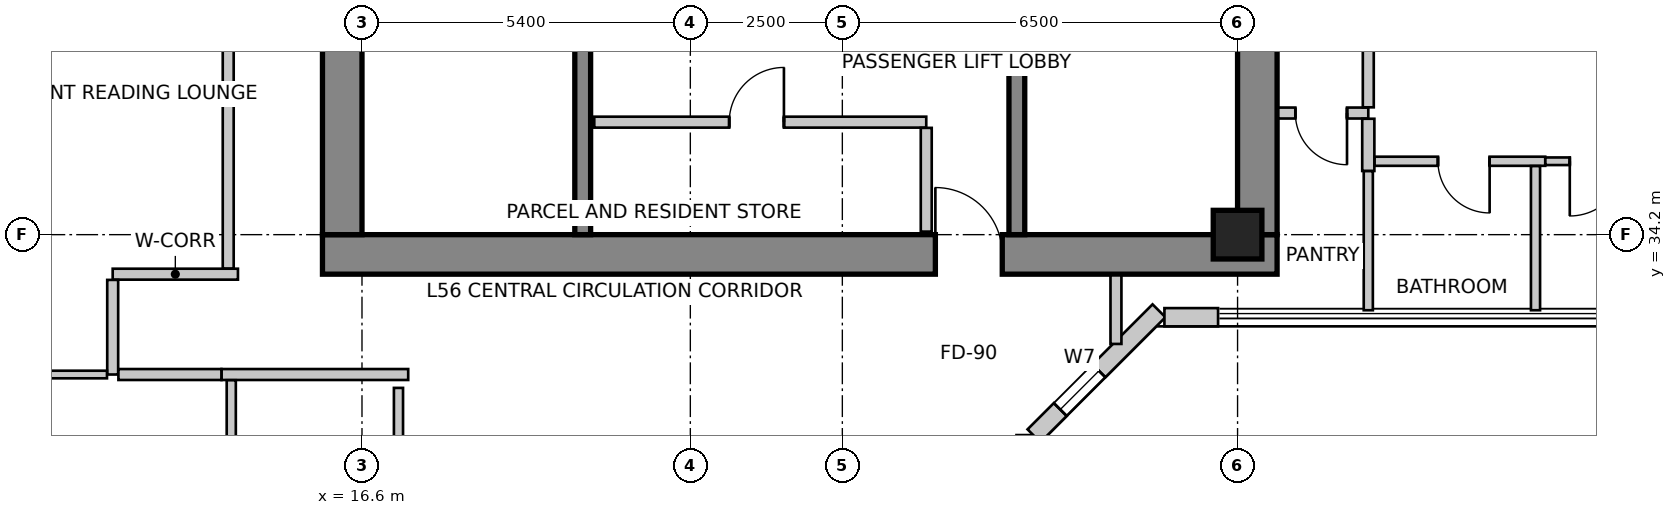
"""IFC4 building model, lengths in metres.
Left out: names, types, materials, properties, quantities, classifications, styles, units other than length and angle.
Written with IfcOpenShell. Run it as: python <this file> out.ifc"""

import sys

from ifc_helpers import new_model, si_unit, direction, frame, frame_2d, origin, origin_2d, place, context, subcontext, project, spatial, rectangle, extrude, source, transform, mapped, element, fill, save


model = new_model("IFC4")
c1 = context("Model", 3, precision=1e-05, world=origin(), true_north=direction((0.0, 1.0)))
c2 = subcontext(c1, "Body", "Model", "MODEL_VIEW")
j1 = project(units=[si_unit("LENGTHUNIT", "METRE"), si_unit("PLANEANGLEUNIT", "RADIAN")], contexts=[c1])
p1 = place(None, origin())
s1 = spatial("IfcSite", under=j1, at=p1, CompositionType="ELEMENT")
p2 = place(p1, origin())
s2 = spatial("IfcBuilding", under=s1, at=p2, CompositionType="ELEMENT")
p3 = place(p2, frame((0.0, 0.0, 221.9)))
s3 = spatial("IfcBuildingStorey", under=s2, at=p3, CompositionType="ELEMENT", Elevation=221.9)
p4 = place(p3, frame((15.95, 33.875, 0.0), z_axis=(0.0, 0.0, 1.0), x_axis=(1.0, 0.0, 0.0)))
e1 = element("IfcWall", 1, at=p4, inside=s3, PredefinedType="SHEAR", context=c2, shape_type="SweptSolid", body=[
    extrude(rectangle(XDim=15.7, YDim=0.65, at=frame_2d((7.85, 0.0))), origin(), (0.0, 0.0, 1.0), 3.5),
])
m1 = source(origin(), c2, "Body", "SweptSolid", [
    extrude(rectangle(XDim=1.1, YDim=2.15, at=frame_2d((0.55, 1.075))), frame((0.0, 0.335, 0.0), z_axis=(0.0, -1.0, 0.0), x_axis=(1.0, 0.0, 0.0)), (0.0, 0.0, 1.0), 0.67),
])
p5 = place(p4, frame((10.08, 0.0, 0.0)))
e2 = element("IfcOpeningElement", 2, at=p5, cuts=e1, PredefinedType="OPENING", context=c2, shape_type="MappedRepresentation", body=[
    mapped(m1, transform((0.0, 0.0, 0.0), scale=1.0)),
])
p6 = place(p3, frame((16.275, 34.2, 0.0), z_axis=(0.0, 0.0, 1.0), x_axis=(0.0, 1.0, 0.0)))
e3 = element("IfcWall", 3, at=p6, inside=s3, PredefinedType="SHEAR", context=c2, shape_type="SweptSolid", body=[
    extrude(rectangle(XDim=11.4, YDim=0.65, at=frame_2d((5.7, 0.0))), origin(), (0.0, 0.0, 1.0), 3.5),
])
p7 = place(p6, frame((7.15, 0.0, 0.0)))
e4 = element("IfcOpeningElement", 4, at=p7, cuts=e3, PredefinedType="OPENING", context=c2, shape_type="MappedRepresentation", body=[
    mapped(m1, transform((0.0, 0.0, 0.0), scale=1.0)),
])
p8 = place(p3, frame((31.325, 34.2, 0.0), z_axis=(0.0, 0.0, 1.0), x_axis=(0.0, 1.0, 0.0)))
e5 = element("IfcWall", 5, at=p8, inside=s3, PredefinedType="SHEAR", context=c2, shape_type="SweptSolid", body=[
    extrude(rectangle(XDim=11.4, YDim=0.65, at=frame_2d((5.7, 0.0))), origin(), (0.0, 0.0, 1.0), 3.5),
])
p9 = place(p8, frame((7.35, 0.0, 0.0)))
e6 = element("IfcOpeningElement", 6, at=p9, cuts=e5, PredefinedType="OPENING", context=c2, shape_type="MappedRepresentation", body=[
    mapped(m1, transform((0.0, 0.0, 0.0), scale=1.0)),
])
p10 = place(p3, frame((20.23, 34.2, 0.0), z_axis=(0.0, 0.0, 1.0), x_axis=(0.0, 1.0, 0.0)))
e7 = element("IfcWall", 7, at=p10, inside=s3, PredefinedType="SHEAR", context=c2, shape_type="SweptSolid", body=[
    extrude(rectangle(XDim=9.06, YDim=0.26, at=frame_2d((4.53, 0.0))), origin(), (0.0, 0.0, 1.0), 3.5),
])
m2 = source(origin(), c2, "Body", "SweptSolid", [
    extrude(rectangle(XDim=1.1, YDim=2.15, at=frame_2d((0.55, 1.075))), frame((0.0, 0.14, 0.0), z_axis=(0.0, -1.0, 0.0), x_axis=(1.0, 0.0, 0.0)), (0.0, 0.0, 1.0), 0.28),
])
p11 = place(p10, frame((7.45, 0.0, 0.0)))
e8 = element("IfcOpeningElement", 8, at=p11, cuts=e7, PredefinedType="OPENING", context=c2, shape_type="MappedRepresentation", body=[
    mapped(m2, transform((0.0, 0.0, 0.0), scale=1.0)),
])
p12 = place(p3, frame((27.37, 34.2, 0.0), z_axis=(0.0, 0.0, 1.0), x_axis=(0.0, 1.0, 0.0)))
e9 = element("IfcWall", 9, at=p12, inside=s3, PredefinedType="SHEAR", context=c2, shape_type="SweptSolid", body=[
    extrude(rectangle(XDim=9.06, YDim=0.26, at=frame_2d((4.53, 0.0))), origin(), (0.0, 0.0, 1.0), 3.5),
])
p13 = place(p12, frame((7.45, 0.0, 0.0)))
e10 = element("IfcOpeningElement", 10, at=p13, cuts=e9, PredefinedType="OPENING", context=c2, shape_type="MappedRepresentation", body=[
    mapped(m2, transform((0.0, 0.0, 0.0), scale=1.0)),
])
m3 = source(origin(), c2, "Body", "SweptSolid", [
    extrude(rectangle(XDim=0.8, YDim=0.8, at=origin_2d()), origin(), (0.0, 0.0, 1.0), 3.5),
])
p14 = place(p3, frame((31.0, 34.2, 0.0), z_axis=(0.0, 0.0, 1.0), x_axis=(1.0, 0.0, 0.0)))
e11 = element("IfcColumn", 11, at=p14, inside=s3, PredefinedType="COLUMN", context=c2, shape_type="MappedRepresentation", body=[
    mapped(m3, transform((0.0, 0.0, 0.0), scale=1.0)),
])
p15 = place(p3, frame((27.514, 29.677, 0.0), z_axis=(0.0, 0.0, 1.0), x_axis=(0.0, 1.0, 0.0)))
e12 = element("IfcWall", 12, at=p15, inside=s3, PredefinedType="SOLIDWALL", context=c2, shape_type="SweptSolid", body=[
    extrude(rectangle(XDim=1.228, YDim=0.3, at=frame_2d((0.614, 0.0))), origin(), (0.0, 0.0, 1.0), 3.25),
])
p16 = place(p3, frame((27.652, 30.892, 0.0), z_axis=(0.0, 0.0, 1.0), x_axis=(0.707106781187, 0.707106781187, 0.0)))
e13 = element("IfcWall", 13, at=p16, inside=s3, PredefinedType="SOLIDWALL", context=c2, shape_type="SweptSolid", body=[
    extrude(rectangle(XDim=2.907, YDim=0.3, at=frame_2d((1.454, 0.0))), origin(), (0.0, 0.0, 1.0), 3.25),
])
m4 = source(origin(), c2, "Body", "SweptSolid", [
    extrude(rectangle(XDim=0.9, YDim=1.6, at=frame_2d((0.45, 0.8))), frame((0.0, 0.16, 0.0), z_axis=(0.0, -1.0, 0.0), x_axis=(1.0, 0.0, 0.0)), (0.0, 0.0, 1.0), 0.32),
])
p17 = place(p16, frame((0.611, 0.0, 0.85)))
e14 = element("IfcOpeningElement", 14, at=p17, cuts=e13, PredefinedType="OPENING", context=c2, shape_type="MappedRepresentation", body=[
    mapped(m4, transform((0.0, 0.0, 0.0), scale=1.0)),
])
p18 = place(p3, frame((29.797, 32.842, 0.0), z_axis=(0.0, 0.0, 1.0), x_axis=(1.0, 0.0, 0.0)))
e15 = element("IfcWall", 15, at=p18, inside=s3, PredefinedType="SOLIDWALL", context=c2, shape_type="SweptSolid", body=[
    extrude(rectangle(XDim=0.882, YDim=0.3, at=frame_2d((0.441, 0.0))), origin(), (0.0, 0.0, 1.0), 3.25),
])
p19 = place(p3, frame((13.269, 47.134, 0.0), z_axis=(0.0, 0.0, 1.0), x_axis=(-0.319920776449, -0.947444297464, 0.0)))
e16 = element("IfcWall", 16, at=p19, inside=s3, PredefinedType="SOLIDWALL", context=c2, shape_type="SweptSolid", body=[
    extrude(rectangle(XDim=16.133, YDim=0.3, at=frame_2d((8.067, 0.0))), origin(), (0.0, 0.0, 1.0), 3.25),
])
m5 = source(origin(), c2, "Body", "SweptSolid", [
    extrude(rectangle(XDim=2.4, YDim=2.2, at=frame_2d((1.2, 1.1))), frame((0.0, 0.16, 0.0), z_axis=(0.0, -1.0, 0.0), x_axis=(1.0, 0.0, 0.0)), (0.0, 0.0, 1.0), 0.32),
])
p20 = place(p19, frame((2.363, 0.0, 0.85)))
e17 = element("IfcOpeningElement", 17, at=p20, cuts=e16, PredefinedType="OPENING", context=c2, shape_type="MappedRepresentation", body=[
    mapped(m5, transform((0.0, 0.0, 0.0), scale=1.0)),
])
m6 = source(origin(), c2, "Body", "SweptSolid", [
    extrude(rectangle(XDim=2.1, YDim=2.0, at=frame_2d((1.05, 1.0))), frame((0.0, 0.16, 0.0), z_axis=(0.0, -1.0, 0.0), x_axis=(1.0, 0.0, 0.0)), (0.0, 0.0, 1.0), 0.32),
])
p21 = place(p19, frame((7.41, 0.0, 0.85)))
e18 = element("IfcOpeningElement", 18, at=p21, cuts=e16, PredefinedType="OPENING", context=c2, shape_type="MappedRepresentation", body=[
    mapped(m6, transform((0.0, 0.0, 0.0), scale=1.0)),
])
p22 = place(p19, frame((12.157, 0.0, 0.85)))
e19 = element("IfcOpeningElement", 19, at=p22, cuts=e16, PredefinedType="OPENING", context=c2, shape_type="MappedRepresentation", body=[
    mapped(m5, transform((0.0, 0.0, 0.0), scale=1.0)),
])
p23 = place(p3, frame((8.188, 31.834, 0.0), z_axis=(0.0, 0.0, 1.0), x_axis=(0.202303475707, -0.979322880217, 0.0)))
e20 = element("IfcWall", 20, at=p23, inside=s3, PredefinedType="SOLIDWALL", context=c2, shape_type="SweptSolid", body=[
    extrude(rectangle(XDim=15.766, YDim=0.3, at=frame_2d((7.883, 0.0))), origin(), (0.0, 0.0, 1.0), 3.25),
])
p24 = place(p23, frame((1.407, 0.0, 0.85)))
e21 = element("IfcOpeningElement", 21, at=p24, cuts=e20, PredefinedType="OPENING", context=c2, shape_type="MappedRepresentation", body=[
    mapped(m6, transform((0.0, 0.0, 0.0), scale=1.0)),
])
p25 = place(p23, frame((6.194, 0.0, 0.85)))
e22 = element("IfcOpeningElement", 22, at=p25, cuts=e20, PredefinedType="OPENING", context=c2, shape_type="MappedRepresentation", body=[
    mapped(m6, transform((0.0, 0.0, 0.0), scale=1.0)),
])
p26 = place(p23, frame((11.054, 0.0, 0.85)))
e23 = element("IfcOpeningElement", 23, at=p26, cuts=e20, PredefinedType="OPENING", context=c2, shape_type="MappedRepresentation", body=[
    mapped(m6, transform((0.0, 0.0, 0.0), scale=1.0)),
])
p27 = place(p3, frame((20.42, 36.05, 0.0), z_axis=(0.0, 0.0, 1.0), x_axis=(1.0, 0.0, 0.0)))
e24 = element("IfcWall", 24, at=p27, inside=s3, PredefinedType="PARTITIONING", context=c2, shape_type="SweptSolid", body=[
    extrude(rectangle(XDim=5.46, YDim=0.18, at=frame_2d((2.73, 0.0))), origin(), (0.0, 0.0, 1.0), 3.25),
])
m7 = source(origin(), c2, "Body", "SweptSolid", [
    extrude(rectangle(XDim=0.9, YDim=2.15, at=frame_2d((0.45, 1.075))), frame((0.0, 0.1, 0.0), z_axis=(0.0, -1.0, 0.0), x_axis=(1.0, 0.0, 0.0)), (0.0, 0.0, 1.0), 0.2),
])
p28 = place(p27, frame((2.219, 0.0, 0.0)))
e25 = element("IfcOpeningElement", 25, at=p28, cuts=e24, PredefinedType="OPENING", context=c2, shape_type="MappedRepresentation", body=[
    mapped(m7, transform((0.0, 0.0, 0.0), scale=1.0)),
])
p29 = place(p3, frame((25.88, 35.956, 0.0), z_axis=(0.0, 0.0, 1.0), x_axis=(0.0, -1.0, 0.0)))
e26 = element("IfcWall", 26, at=p29, inside=s3, PredefinedType="PARTITIONING", context=c2, shape_type="SweptSolid", body=[
    extrude(rectangle(XDim=1.706, YDim=0.18, at=frame_2d((0.853, 0.0))), origin(), (0.0, 0.0, 1.0), 2.542),
])
p30 = place(p3, frame((12.5, 33.55, 0.0), z_axis=(0.0, 0.0, 1.0), x_axis=(1.0, 0.0, 0.0)))
e27 = element("IfcWall", 27, at=p30, inside=s3, PredefinedType="PARTITIONING", context=c2, shape_type="SweptSolid", body=[
    extrude(rectangle(XDim=2.06, YDim=0.18, at=frame_2d((1.03, 0.0))), origin(), (0.0, 0.0, 1.0), 3.25),
])
p31 = place(p3, frame((12.5, 31.9, 0.0), z_axis=(0.0, 0.0, 1.0), x_axis=(0.0, 1.0, 0.0)))
e28 = element("IfcWall", 28, at=p31, inside=s3, PredefinedType="PARTITIONING", context=c2, shape_type="SweptSolid", body=[
    extrude(rectangle(XDim=1.556, YDim=0.18, at=frame_2d((0.778, 0.0))), origin(), (0.0, 0.0, 1.0), 2.934),
])
p32 = place(p3, frame((29.0, 33.53, 0.0), z_axis=(0.0, 0.0, 1.0), x_axis=(0.0, -1.0, 0.0)))
e29 = element("IfcWall", 29, at=p32, inside=s3, PredefinedType="PARTITIONING", context=c2, shape_type="SweptSolid", body=[
    extrude(rectangle(XDim=1.127, YDim=0.18, at=frame_2d((0.563, 0.0))), origin(), (0.0, 0.0, 1.0), 3.25),
])
p33 = place(p3, frame((17.36, 31.9, 0.0), z_axis=(0.0, 0.0, 1.0), x_axis=(-1.0, 0.0, 0.0)))
e30 = element("IfcWall", 30, at=p33, inside=s3, PredefinedType="PARTITIONING", context=c2, shape_type="SweptSolid", body=[
    extrude(rectangle(XDim=3.07, YDim=0.18, at=frame_2d((1.535, 0.0))), origin(), (0.0, 0.0, 1.0), 2.934),
])
p34 = place(p3, frame((14.288, 31.9, 0.0), z_axis=(0.0, 0.0, 1.0), x_axis=(-1.0, 0.0, 0.0)))
e31 = element("IfcWall", 31, at=p34, inside=s3, PredefinedType="PARTITIONING", context=c2, shape_type="SweptSolid", body=[
    extrude(rectangle(XDim=1.694, YDim=0.18, at=frame_2d((0.847, 0.0))), origin(), (0.0, 0.0, 1.0), 2.934),
])
p35 = place(p3, frame((14.4, 33.644, 0.0), z_axis=(0.0, 0.0, 1.0), x_axis=(0.0, 1.0, 0.0)))
e32 = element("IfcWall", 32, at=p35, inside=s3, PredefinedType="PARTITIONING", context=c2, shape_type="SweptSolid", body=[
    extrude(rectangle(XDim=12.606, YDim=0.18, at=frame_2d((6.303, 0.0))), origin(), (0.0, 0.0, 1.0), 3.25),
])
p36 = place(p35, frame((4.399, 0.0, 0.0)))
e33 = element("IfcOpeningElement", 33, at=p36, cuts=e32, PredefinedType="OPENING", context=c2, shape_type="MappedRepresentation", body=[
    mapped(m7, transform((0.0, 0.0, 0.0), scale=1.0)),
])
p37 = place(p3, frame((33.15, 36.2, 0.0), z_axis=(0.0, 0.0, 1.0), x_axis=(-1.0, 0.0, 0.0)))
e34 = element("IfcWall", 34, at=p37, inside=s3, PredefinedType="PARTITIONING", context=c2, shape_type="SweptSolid", body=[
    extrude(rectangle(XDim=1.48, YDim=0.18, at=frame_2d((0.74, 0.0))), origin(), (0.0, 0.0, 1.0), 3.25),
])
m8 = source(origin(), c2, "Body", "SweptSolid", [
    extrude(rectangle(XDim=0.85, YDim=2.15, at=frame_2d((0.425, 1.075))), frame((0.0, 0.1, 0.0), z_axis=(0.0, -1.0, 0.0), x_axis=(1.0, 0.0, 0.0)), (0.0, 0.0, 1.0), 0.2),
])
p38 = place(p37, frame((0.35, 0.0, 0.0)))
e35 = element("IfcOpeningElement", 35, at=p38, cuts=e34, PredefinedType="OPENING", context=c2, shape_type="MappedRepresentation", body=[
    mapped(m8, transform((0.0, 0.0, 0.0), scale=1.0)),
])
p39 = place(p3, frame((33.15, 38.36, 0.0), z_axis=(0.0, 0.0, 1.0), x_axis=(0.0, -1.0, 0.0)))
e36 = element("IfcWall", 36, at=p39, inside=s3, PredefinedType="PARTITIONING", context=c2, shape_type="SweptSolid", body=[
    extrude(rectangle(XDim=2.066, YDim=0.18, at=frame_2d((1.033, 0.0))), origin(), (0.0, 0.0, 1.0), 3.25),
])
p40 = place(p3, frame((12.406, 31.9, 0.0), z_axis=(0.0, 0.0, 1.0), x_axis=(-1.0, 0.0, 0.0)))
e37 = element("IfcWall", 37, at=p40, inside=s3, PredefinedType="PARTITIONING", context=c2, shape_type="SweptSolid", body=[
    extrude(rectangle(XDim=4.115, YDim=0.125, at=frame_2d((2.057, 0.0))), origin(), (0.0, 0.0, 1.0), 2.542),
])
p41 = place(p3, frame((33.15, 36.106, 0.0), z_axis=(0.0, 0.0, 1.0), x_axis=(0.0, -1.0, 0.0)))
e38 = element("IfcWall", 38, at=p41, inside=s3, PredefinedType="PARTITIONING", context=c2, shape_type="SweptSolid", body=[
    extrude(rectangle(XDim=0.859, YDim=0.2, at=frame_2d((0.429, 0.0))), origin(), (0.0, 0.0, 1.0), 3.25),
])
p42 = place(p3, frame((33.15, 35.245, 0.0), z_axis=(0.0, 0.0, 1.0), x_axis=(0.0, -1.0, 0.0)))
e39 = element("IfcWall", 39, at=p42, inside=s3, PredefinedType="PARTITIONING", context=c2, shape_type="SweptSolid", body=[
    extrude(rectangle(XDim=2.288, YDim=0.15, at=frame_2d((1.144, 0.0))), origin(), (0.0, 0.0, 1.0), 3.25),
])
p43 = place(p3, frame((36.06, 35.407, 0.0), z_axis=(0.0, 0.0, 1.0), x_axis=(-1.0, 0.0, 0.0)))
e40 = element("IfcWall", 40, at=p43, inside=s3, PredefinedType="PARTITIONING", context=c2, shape_type="SweptSolid", body=[
    extrude(rectangle(XDim=2.806, YDim=0.15, at=frame_2d((1.403, 0.0))), origin(), (0.0, 0.0, 1.0), 3.25),
])
m9 = source(origin(), c2, "Body", "SweptSolid", [
    extrude(rectangle(XDim=0.85, YDim=2.15, at=frame_2d((0.425, 1.075))), frame((0.0, 0.085, 0.0), z_axis=(0.0, -1.0, 0.0), x_axis=(1.0, 0.0, 0.0)), (0.0, 0.0, 1.0), 0.17),
])
p44 = place(p43, frame((0.915, 0.0, 0.0)))
e41 = element("IfcOpeningElement", 41, at=p44, cuts=e40, PredefinedType="OPENING", context=c2, shape_type="MappedRepresentation", body=[
    mapped(m9, transform((0.0, 0.0, 0.0), scale=1.0)),
])
p45 = place(p3, frame((39.833, 35.407, 0.0), z_axis=(0.0, 0.0, 1.0), x_axis=(-1.0, 0.0, 0.0)))
e42 = element("IfcWall", 42, at=p45, inside=s3, PredefinedType="PARTITIONING", context=c2, shape_type="SweptSolid", body=[
    extrude(rectangle(XDim=3.771, YDim=0.125, at=frame_2d((1.886, 0.0))), origin(), (0.0, 0.0, 1.0), 2.766),
])
m10 = source(origin(), c2, "Body", "SweptSolid", [
    extrude(rectangle(XDim=0.9, YDim=2.15, at=frame_2d((0.45, 1.075))), frame((0.0, 0.073, 0.0), z_axis=(0.0, -1.0, 0.0), x_axis=(1.0, 0.0, 0.0)), (0.0, 0.0, 1.0), 0.145),
])
p46 = place(p45, frame((2.47, 0.0, 0.0)))
e43 = element("IfcOpeningElement", 43, at=p46, cuts=e42, PredefinedType="OPENING", context=c2, shape_type="MappedRepresentation", body=[
    mapped(m10, transform((0.0, 0.0, 0.0), scale=1.0)),
])
p47 = place(p3, frame((35.9, 35.328, 0.0), z_axis=(0.0, 0.0, 1.0), x_axis=(0.0, -1.0, 0.0)))
e44 = element("IfcWall", 44, at=p47, inside=s3, PredefinedType="PARTITIONING", context=c2, shape_type="SweptSolid", body=[
    extrude(rectangle(XDim=2.371, YDim=0.15, at=frame_2d((1.186, 0.0))), origin(), (0.0, 0.0, 1.0), 3.25),
])
p48 = place(p3, frame((14.45, 27.221, 0.0), z_axis=(0.0, 0.0, 1.0), x_axis=(0.0, 1.0, 0.0)))
e45 = element("IfcWall", 45, at=p48, inside=s3, PredefinedType="PARTITIONING", context=c2, shape_type="SweptSolid", body=[
    extrude(rectangle(XDim=4.585, YDim=0.15, at=frame_2d((2.292, 0.0))), origin(), (0.0, 0.0, 1.0), 2.766),
])
p49 = place(p3, frame((17.2, 31.68, 0.0), z_axis=(0.0, 0.0, 1.0), x_axis=(0.0, -1.0, 0.0)))
e46 = element("IfcWall", 46, at=p49, inside=s3, PredefinedType="PARTITIONING", context=c2, shape_type="SweptSolid", body=[
    extrude(rectangle(XDim=4.318, YDim=0.15, at=frame_2d((2.159, 0.0))), origin(), (0.0, 0.0, 1.0), 2.766),
])
m11 = source(origin(), c2, "Body", "SweptSolid", [
    extrude(rectangle(XDim=0.9, YDim=1.6, at=frame_2d((0.45, 0.8))), frame((0.0, -0.015, 0.0), z_axis=(0.0, -1.0, 0.0), x_axis=(1.0, 0.0, 0.0)), (0.0, 0.0, 1.0), 0.06),
])
p50 = place(p17, origin())
e47 = element("IfcWindow", 47, at=p50, inside=s3, PartitioningType="SINGLE_PANEL", PredefinedType="WINDOW", context=c2, shape_type="MappedRepresentation", body=[
    mapped(m11, transform((0.0, 0.0, 0.0), scale=1.0)),
])
fill(e14, e47)
m12 = source(origin(), c2, "Body", "SweptSolid", [
    extrude(rectangle(XDim=1.1, YDim=2.15, at=frame_2d((0.55, 1.075))), frame((0.0, 0.025, 0.0), z_axis=(0.0, -1.0, 0.0), x_axis=(1.0, 0.0, 0.0)), (0.0, 0.0, 1.0), 0.05),
])
p51 = place(p5, origin())
e48 = element("IfcDoor", 48, at=p51, inside=s3, OperationType="SINGLE_SWING_LEFT", PredefinedType="DOOR", context=c2, shape_type="MappedRepresentation", body=[
    mapped(m12, transform((0.0, 0.0, 0.0), scale=1.0)),
])
fill(e2, e48)
m13 = source(origin(), c2, "Body", "SweptSolid", [
    extrude(rectangle(XDim=0.9, YDim=2.15, at=frame_2d((0.45, 1.075))), frame((0.0, 0.025, 0.0), z_axis=(0.0, -1.0, 0.0), x_axis=(1.0, 0.0, 0.0)), (0.0, 0.0, 1.0), 0.05),
])
p52 = place(p28, origin())
e49 = element("IfcDoor", 49, at=p52, inside=s3, OperationType="SINGLE_SWING_RIGHT", PredefinedType="DOOR", context=c2, shape_type="MappedRepresentation", body=[
    mapped(m13, transform((0.0, 0.0, 0.0), scale=1.0)),
])
fill(e25, e49)
m14 = source(origin(), c2, "Body", "SweptSolid", [
    extrude(rectangle(XDim=0.85, YDim=2.15, at=frame_2d((0.425, 1.075))), frame((0.0, 0.025, 0.0), z_axis=(0.0, -1.0, 0.0), x_axis=(1.0, 0.0, 0.0)), (0.0, 0.0, 1.0), 0.05),
])
p53 = place(p38, origin())
e50 = element("IfcDoor", 50, at=p53, inside=s3, OperationType="SINGLE_SWING_LEFT", PredefinedType="DOOR", context=c2, shape_type="MappedRepresentation", body=[
    mapped(m14, transform((0.0, 0.0, 0.0), scale=1.0)),
])
fill(e35, e50)
p54 = place(p44, origin())
e51 = element("IfcDoor", 51, at=p54, inside=s3, OperationType="SINGLE_SWING_LEFT", PredefinedType="DOOR", context=c2, shape_type="MappedRepresentation", body=[
    mapped(m14, transform((0.0, 0.0, 0.0), scale=1.0)),
])
fill(e41, e51)
m15 = source(origin(), c2, "Body", "SweptSolid", [
    extrude(rectangle(XDim=0.9, YDim=2.15, at=frame_2d((0.45, 1.075))), frame((0.0, 0.025, 0.0), z_axis=(0.0, -1.0, 0.0), x_axis=(1.0, 0.0, 0.0)), (0.0, 0.0, 1.0), 0.05),
])
p55 = place(p46, origin())
e52 = element("IfcDoor", 52, at=p55, inside=s3, OperationType="SINGLE_SWING_RIGHT", PredefinedType="DOOR", context=c2, shape_type="MappedRepresentation", body=[
    mapped(m15, transform((0.0, 0.0, 0.0), scale=1.0)),
])
fill(e43, e52)
save(model, sys.argv[1])
